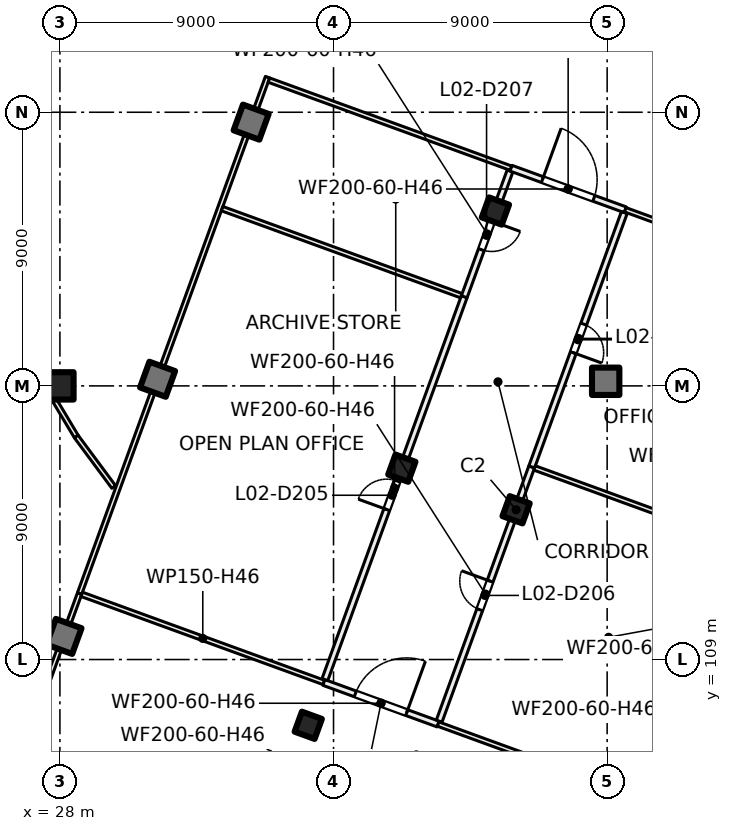
"""IFC4 building model, lengths in metres.
Left out: names, types, materials, properties, quantities, classifications, styles, units other than length and angle.
Written with IfcOpenShell. Run it as: python <this file> out.ifc"""

import sys

from ifc_helpers import new_model, si_unit, direction, frame, frame_2d, origin, origin_2d, place, context, subcontext, project, spatial, rectangle, extrude, element, fill, save


model = new_model("IFC4")
c1 = context("Model", 3, precision=1e-05, world=origin(), true_north=direction((0.0, 1.0)))
c2 = subcontext(c1, "Body", "Model", "MODEL_VIEW")
j1 = project(units=[si_unit("LENGTHUNIT", "METRE"), si_unit("PLANEANGLEUNIT", "RADIAN")], contexts=[c1])
p1 = place(None, origin())
s1 = spatial("IfcSite", under=j1, at=p1, CompositionType="ELEMENT")
p2 = place(p1, origin())
s2 = spatial("IfcBuilding", under=s1, at=p2, CompositionType="ELEMENT")
p3 = place(p2, frame((0.0, 0.0, 12.5)))
s3 = spatial("IfcBuildingStorey", under=s2, at=p3, CompositionType="ELEMENT", Elevation=12.5)
for number, where, z_axis, x_axis in (
    (1, (28.0, 118.0, 0.0), (0.0, 0.0, 1.0), (1.0, 0.0, 0.0)),
    (2, (45.952, 118.152, 0.0), (0.0, 0.0, 1.0), (1.0, 0.0, 0.0)),
):
    element("IfcColumn", number, at=place(p3, frame(where, z_axis=z_axis, x_axis=x_axis)), inside=s3, PredefinedType="COLUMN", context=c2, shape_type="SweptSolid", body=[
        extrude(rectangle(XDim=0.9, YDim=0.9, at=origin_2d()), origin(), (0.0, 0.0, 1.0), 5.0),
    ])
for number, where, z_axis, x_axis in (
    (3, (43.006, 113.925, 0.0), (0.0, 0.0, 1.0), (-0.342, -0.94, 0.0)),
    (4, (42.325, 123.751, 0.0), (0.0, 0.0, 1.0), (-0.342, -0.94, 0.0)),
    (5, (39.247, 115.293, 0.0), (0.0, 0.0, 1.0), (-0.342, -0.94, 0.0)),
    (6, (36.169, 106.836, 0.0), (0.0, 0.0, 1.0), (-0.342, -0.94, 0.0)),
):
    element("IfcColumn", number, at=place(p3, frame(where, z_axis=z_axis, x_axis=x_axis)), inside=s3, PredefinedType="COLUMN", context=c2, shape_type="SweptSolid", body=[
        extrude(rectangle(XDim=0.7, YDim=0.7, at=origin_2d()), origin(), (0.0, 0.0, 1.0), 5.0),
    ])
for number, where, z_axis, x_axis in (
    (7, (34.291, 126.675, 0.0), (0.0, 0.0, 1.0), (-0.342, -0.94, 0.0)),
    (8, (31.212, 118.218, 0.0), (0.0, 0.0, 1.0), (-0.342, -0.94, 0.0)),
    (9, (28.134, 109.76, 0.0), (0.0, 0.0, 1.0), (-0.342, -0.94, 0.0)),
):
    element("IfcColumn", number, at=place(p3, frame(where, z_axis=z_axis, x_axis=x_axis)), inside=s3, PredefinedType="COLUMN", context=c2, shape_type="SweptSolid", body=[
        extrude(rectangle(XDim=0.9, YDim=0.9, at=origin_2d()), origin(), (0.0, 0.0, 1.0), 5.0),
    ])
p4 = place(p3, frame((12.199, 89.809, 0.0), z_axis=(0.0, 0.0, 1.0), x_axis=(0.342022998908, 0.939691581434, 0.0)))
e10 = element("IfcWall", 10, at=p4, inside=s3, PredefinedType="SOLIDWALL", context=c2, shape_type="SweptSolid", body=[
    extrude(rectangle(XDim=47.334, YDim=0.6, at=frame_2d((23.667, 0.0))), origin(), (0.0, 0.0, 1.0), 4.6),
])
p5 = place(p4, frame((0.773, 0.0, 0.9)))
e11 = element("IfcOpeningElement", 11, at=p5, cuts=e10, PredefinedType="OPENING", context=c2, shape_type="SweptSolid", body=[
    extrude(rectangle(XDim=3.0, YDim=3.0, at=frame_2d((1.5, 1.5))), frame((0.0, 0.31, 0.0), z_axis=(0.0, -1.0, 0.0), x_axis=(1.0, 0.0, 0.0)), (0.0, 0.0, 1.0), 0.62),
])
p6 = place(p4, frame((5.379, 0.0, 0.9)))
e12 = element("IfcOpeningElement", 12, at=p6, cuts=e10, PredefinedType="OPENING", context=c2, shape_type="SweptSolid", body=[
    extrude(rectangle(XDim=3.0, YDim=3.0, at=frame_2d((1.5, 1.5))), frame((0.0, 0.31, 0.0), z_axis=(0.0, -1.0, 0.0), x_axis=(1.0, 0.0, 0.0)), (0.0, 0.0, 1.0), 0.62),
])
p7 = place(p4, frame((9.235, 0.0, 0.9)))
e13 = element("IfcOpeningElement", 13, at=p7, cuts=e10, PredefinedType="OPENING", context=c2, shape_type="SweptSolid", body=[
    extrude(rectangle(XDim=3.0, YDim=3.0, at=frame_2d((1.5, 1.5))), frame((0.0, 0.31, 0.0), z_axis=(0.0, -1.0, 0.0), x_axis=(1.0, 0.0, 0.0)), (0.0, 0.0, 1.0), 0.62),
])
p8 = place(p4, frame((14.786, 0.0, 0.9)))
e14 = element("IfcOpeningElement", 14, at=p8, cuts=e10, PredefinedType="OPENING", context=c2, shape_type="SweptSolid", body=[
    extrude(rectangle(XDim=1.2, YDim=3.0, at=frame_2d((0.6, 1.5))), frame((0.0, 0.31, 0.0), z_axis=(0.0, -1.0, 0.0), x_axis=(1.0, 0.0, 0.0)), (0.0, 0.0, 1.0), 0.62),
])
p9 = place(p4, frame((16.286, 0.0, 0.9)))
e15 = element("IfcOpeningElement", 15, at=p9, cuts=e10, PredefinedType="OPENING", context=c2, shape_type="SweptSolid", body=[
    extrude(rectangle(XDim=1.2, YDim=3.0, at=frame_2d((0.6, 1.5))), frame((0.0, 0.31, 0.0), z_axis=(0.0, -1.0, 0.0), x_axis=(1.0, 0.0, 0.0)), (0.0, 0.0, 1.0), 0.62),
])
p10 = place(p4, frame((18.118, 0.0, 0.9)))
e16 = element("IfcOpeningElement", 16, at=p10, cuts=e10, PredefinedType="OPENING", context=c2, shape_type="SweptSolid", body=[
    extrude(rectangle(XDim=1.2, YDim=3.0, at=frame_2d((0.6, 1.5))), frame((0.0, 0.31, 0.0), z_axis=(0.0, -1.0, 0.0), x_axis=(1.0, 0.0, 0.0)), (0.0, 0.0, 1.0), 0.62),
])
p11 = place(p4, frame((19.618, 0.0, 0.9)))
e17 = element("IfcOpeningElement", 17, at=p11, cuts=e10, PredefinedType="OPENING", context=c2, shape_type="SweptSolid", body=[
    extrude(rectangle(XDim=1.2, YDim=3.0, at=frame_2d((0.6, 1.5))), frame((0.0, 0.31, 0.0), z_axis=(0.0, -1.0, 0.0), x_axis=(1.0, 0.0, 0.0)), (0.0, 0.0, 1.0), 0.62),
])
p12 = place(p4, frame((22.452, 0.0, 0.9)))
e18 = element("IfcOpeningElement", 18, at=p12, cuts=e10, PredefinedType="OPENING", context=c2, shape_type="SweptSolid", body=[
    extrude(rectangle(XDim=3.0, YDim=3.0, at=frame_2d((1.5, 1.5))), frame((0.0, 0.31, 0.0), z_axis=(0.0, -1.0, 0.0), x_axis=(1.0, 0.0, 0.0)), (0.0, 0.0, 1.0), 0.62),
])
p13 = place(p4, frame((26.458, 0.0, 0.9)))
e19 = element("IfcOpeningElement", 19, at=p13, cuts=e10, PredefinedType="OPENING", context=c2, shape_type="SweptSolid", body=[
    extrude(rectangle(XDim=3.0, YDim=3.0, at=frame_2d((1.5, 1.5))), frame((0.0, 0.31, 0.0), z_axis=(0.0, -1.0, 0.0), x_axis=(1.0, 0.0, 0.0)), (0.0, 0.0, 1.0), 0.62),
])
p14 = place(p4, frame((31.064, 0.0, 0.9)))
e20 = element("IfcOpeningElement", 20, at=p14, cuts=e10, PredefinedType="OPENING", context=c2, shape_type="SweptSolid", body=[
    extrude(rectangle(XDim=3.0, YDim=3.0, at=frame_2d((1.5, 1.5))), frame((0.0, 0.31, 0.0), z_axis=(0.0, -1.0, 0.0), x_axis=(1.0, 0.0, 0.0)), (0.0, 0.0, 1.0), 0.62),
])
p15 = place(p4, frame((36.029, 0.0, 0.9)))
e21 = element("IfcOpeningElement", 21, at=p15, cuts=e10, PredefinedType="OPENING", context=c2, shape_type="SweptSolid", body=[
    extrude(rectangle(XDim=1.2, YDim=3.0, at=frame_2d((0.6, 1.5))), frame((0.0, 0.31, 0.0), z_axis=(0.0, -1.0, 0.0), x_axis=(1.0, 0.0, 0.0)), (0.0, 0.0, 1.0), 0.62),
])
p16 = place(p4, frame((39.676, 0.0, 0.9)))
e22 = element("IfcOpeningElement", 22, at=p16, cuts=e10, PredefinedType="OPENING", context=c2, shape_type="SweptSolid", body=[
    extrude(rectangle(XDim=3.0, YDim=3.0, at=frame_2d((1.5, 1.5))), frame((0.0, 0.31, 0.0), z_axis=(0.0, -1.0, 0.0), x_axis=(1.0, 0.0, 0.0)), (0.0, 0.0, 1.0), 0.62),
])
p17 = place(p4, frame((43.531, 0.0, 0.9)))
e23 = element("IfcOpeningElement", 23, at=p17, cuts=e10, PredefinedType="OPENING", context=c2, shape_type="SweptSolid", body=[
    extrude(rectangle(XDim=3.0, YDim=3.0, at=frame_2d((1.5, 1.5))), frame((0.0, 0.31, 0.0), z_axis=(0.0, -1.0, 0.0), x_axis=(1.0, 0.0, 0.0)), (0.0, 0.0, 1.0), 0.62),
])
p18 = place(p3, frame((27.478, 118.104, 0.0), z_axis=(0.0, 0.0, 1.0), x_axis=(0.514009565734, -0.857784452141, 0.0)))
e24 = element("IfcWall", 24, at=p18, inside=s3, PredefinedType="PARTITIONING", context=c2, shape_type="SweptSolid", body=[
    extrude(rectangle(XDim=2.068, YDim=0.15, at=frame_2d((1.034, 0.0))), origin(), (0.0, 0.0, 1.0), 4.6),
])
p19 = place(p3, frame((27.494, 108.0, 0.0), z_axis=(0.0, 0.0, 1.0), x_axis=(0.341841854689, 0.93975749339, 0.0)))
e25 = element("IfcWall", 25, at=p19, inside=s3, PredefinedType="PARTITIONING", context=c2, shape_type="SweptSolid", body=[
    extrude(rectangle(XDim=3.373, YDim=0.15, at=frame_2d((1.687, 0.0))), origin(), (0.0, 0.0, 1.0), 4.6),
])
p20 = place(p3, frame((28.537, 116.336, 0.0), z_axis=(0.0, 0.0, 1.0), x_axis=(0.595741297031, -0.80317638599, 0.0)))
e26 = element("IfcWall", 26, at=p20, inside=s3, PredefinedType="PARTITIONING", context=c2, shape_type="SweptSolid", body=[
    extrude(rectangle(XDim=2.068, YDim=0.15, at=frame_2d((1.034, 0.0))), origin(), (0.0, 0.0, 1.0), 4.6),
])
p21 = place(p3, frame((28.647, 111.17, 0.0), z_axis=(0.0, 0.0, 1.0), x_axis=(0.342087921954, 0.939667948614, 0.0)))
e27 = element("IfcWall", 27, at=p21, inside=s3, PredefinedType="PARTITIONING", context=c2, shape_type="SweptSolid", body=[
    extrude(rectangle(XDim=18.075, YDim=0.15, at=frame_2d((9.037, 0.0))), origin(), (0.0, 0.0, 1.0), 4.6),
])
p22 = place(p3, frame((28.717, 111.144, 0.0), z_axis=(0.0, 0.0, 1.0), x_axis=(0.939731172492, -0.341914204803, 0.0)))
e28 = element("IfcWall", 28, at=p22, inside=s3, PredefinedType="PARTITIONING", context=c2, shape_type="SweptSolid", body=[
    extrude(rectangle(XDim=8.476, YDim=0.15, at=frame_2d((4.238, 0.0))), origin(), (0.0, 0.0, 1.0), 4.6),
])
p23 = place(p3, frame((33.335, 123.83, 0.0), z_axis=(0.0, 0.0, 1.0), x_axis=(0.939710837098, -0.341970090272, 0.0)))
e29 = element("IfcWall", 29, at=p23, inside=s3, PredefinedType="PARTITIONING", context=c2, shape_type="SweptSolid", body=[
    extrude(rectangle(XDim=8.375, YDim=0.15, at=frame_2d((4.188, 0.0))), origin(), (0.0, 0.0, 1.0), 4.6),
])
p24 = place(p3, frame((34.874, 128.058, 0.0), z_axis=(0.0, 0.0, 1.0), x_axis=(0.939708443164, -0.341976668571, 0.0)))
e30 = element("IfcWall", 30, at=p24, inside=s3, PredefinedType="PARTITIONING", context=c2, shape_type="SweptSolid", body=[
    extrude(rectangle(XDim=8.475, YDim=0.15, at=frame_2d((4.237, 0.0))), origin(), (0.0, 0.0, 1.0), 4.6),
])
p25 = place(p3, frame((40.44, 106.878, 0.0), z_axis=(0.0, 0.0, 1.0), x_axis=(-0.939665029144, 0.342095941228, 0.0)))
e31 = element("IfcWall", 31, at=p25, inside=s3, PredefinedType="PARTITIONING", context=c2, shape_type="SweptSolid", body=[
    extrude(rectangle(XDim=3.999, YDim=0.2, at=frame_2d((2.0, 0.0))), origin(), (0.0, 0.0, 1.0), 4.6),
])
p26 = place(p25, frame((1.099, 0.0, 0.0)))
e32 = element("IfcOpeningElement", 32, at=p26, cuts=e31, PredefinedType="OPENING", context=c2, shape_type="SweptSolid", body=[
    extrude(rectangle(XDim=1.8, YDim=2.1, at=frame_2d((0.9, 1.05))), frame((0.0, 0.11, 0.0), z_axis=(0.0, -1.0, 0.0), x_axis=(1.0, 0.0, 0.0)), (0.0, 0.0, 1.0), 0.22),
])
p27 = place(p3, frame((36.716, 108.34, 0.0), z_axis=(0.0, 0.0, 1.0), x_axis=(0.342018071111, 0.939693375008, 0.0)))
e33 = element("IfcWall", 33, at=p27, inside=s3, PredefinedType="PARTITIONING", context=c2, shape_type="SweptSolid", body=[
    extrude(rectangle(XDim=13.4, YDim=0.2, at=frame_2d((6.7, 0.0))), origin(), (0.0, 0.0, 1.0), 4.6),
])
p28 = place(p27, frame((5.952, 0.0, 0.0)))
e34 = element("IfcOpeningElement", 34, at=p28, cuts=e33, PredefinedType="OPENING", context=c2, shape_type="SweptSolid", body=[
    extrude(rectangle(XDim=1.0, YDim=2.1, at=frame_2d((0.5, 1.05))), frame((0.0, 0.11, 0.0), z_axis=(0.0, -1.0, 0.0), x_axis=(1.0, 0.0, 0.0)), (0.0, 0.0, 1.0), 0.22),
])
p29 = place(p3, frame((43.519, 115.335, 0.0), z_axis=(0.0, 0.0, 1.0), x_axis=(-0.342121866134, -0.939655590476, 0.0)))
e35 = element("IfcWall", 35, at=p29, inside=s3, PredefinedType="PARTITIONING", context=c2, shape_type="SweptSolid", body=[
    extrude(rectangle(XDim=8.9, YDim=0.2, at=frame_2d((4.45, 0.0))), origin(), (0.0, 0.0, 1.0), 4.6),
])
p30 = place(p29, frame((3.998, 0.0, 0.0)))
e36 = element("IfcOpeningElement", 36, at=p30, cuts=e35, PredefinedType="OPENING", context=c2, shape_type="SweptSolid", body=[
    extrude(rectangle(XDim=1.0, YDim=2.1, at=frame_2d((0.5, 1.05))), frame((0.0, 0.11, 0.0), z_axis=(0.0, -1.0, 0.0), x_axis=(1.0, 0.0, 0.0)), (0.0, 0.0, 1.0), 0.22),
])
p31 = place(p3, frame((40.44, 106.878, 0.0), z_axis=(0.0, 0.0, 1.0), x_axis=(0.939672748075, -0.342074738216, 0.0)))
e37 = element("IfcWall", 37, at=p31, inside=s3, PredefinedType="PARTITIONING", context=c2, shape_type="SweptSolid", body=[
    extrude(rectangle(XDim=8.451, YDim=0.15, at=frame_2d((4.226, 0.0))), origin(), (0.0, 0.0, 1.0), 4.6),
])
p32 = place(p3, frame((41.299, 120.932, 0.0), z_axis=(0.0, 0.0, 1.0), x_axis=(0.342063854115, 0.939676710208, 0.0)))
e38 = element("IfcWall", 38, at=p32, inside=s3, PredefinedType="PARTITIONING", context=c2, shape_type="SweptSolid", body=[
    extrude(rectangle(XDim=4.399, YDim=0.2, at=frame_2d((2.2, 0.0))), origin(), (0.0, 0.0, 1.0), 4.6),
])
p33 = place(p32, frame((1.648, 0.0, 0.0)))
e39 = element("IfcOpeningElement", 39, at=p33, cuts=e38, PredefinedType="OPENING", context=c2, shape_type="SweptSolid", body=[
    extrude(rectangle(XDim=1.0, YDim=2.1, at=frame_2d((0.5, 1.05))), frame((0.0, 0.11, 0.0), z_axis=(0.0, -1.0, 0.0), x_axis=(1.0, 0.0, 0.0)), (0.0, 0.0, 1.0), 0.22),
])
p34 = place(p3, frame((42.838, 125.16, 0.0), z_axis=(0.0, 0.0, 1.0), x_axis=(0.939713209288, -0.341963571582, 0.0)))
e40 = element("IfcWall", 40, at=p34, inside=s3, PredefinedType="PARTITIONING", context=c2, shape_type="SweptSolid", body=[
    extrude(rectangle(XDim=4.0, YDim=0.2, at=frame_2d((2.0, 0.0))), origin(), (0.0, 0.0, 1.0), 4.6),
])
p35 = place(p34, frame((1.1, 0.0, 0.0)))
e41 = element("IfcOpeningElement", 41, at=p35, cuts=e40, PredefinedType="OPENING", context=c2, shape_type="SweptSolid", body=[
    extrude(rectangle(XDim=1.8, YDim=2.1, at=frame_2d((0.9, 1.05))), frame((0.0, 0.11, 0.0), z_axis=(0.0, -1.0, 0.0), x_axis=(1.0, 0.0, 0.0)), (0.0, 0.0, 1.0), 0.22),
])
p36 = place(p3, frame((46.563, 123.698, 0.0), z_axis=(0.0, 0.0, 1.0), x_axis=(-0.342024978895, -0.939690860768, 0.0)))
e42 = element("IfcWall", 42, at=p36, inside=s3, PredefinedType="PARTITIONING", context=c2, shape_type="SweptSolid", body=[
    extrude(rectangle(XDim=8.9, YDim=0.2, at=frame_2d((4.45, 0.0))), origin(), (0.0, 0.0, 1.0), 4.6),
])
p37 = place(p36, frame((3.902, 0.0, 0.0)))
e43 = element("IfcOpeningElement", 43, at=p37, cuts=e42, PredefinedType="OPENING", context=c2, shape_type="SweptSolid", body=[
    extrude(rectangle(XDim=1.0, YDim=2.1, at=frame_2d((0.5, 1.05))), frame((0.0, 0.11, 0.0), z_axis=(0.0, -1.0, 0.0), x_axis=(1.0, 0.0, 0.0)), (0.0, 0.0, 1.0), 0.22),
])
p38 = place(p3, frame((43.613, 115.301, 0.0), z_axis=(0.0, 0.0, 1.0), x_axis=(0.93970742794, -0.341979458265, 0.0)))
e44 = element("IfcWall", 44, at=p38, inside=s3, PredefinedType="PARTITIONING", context=c2, shape_type="SweptSolid", body=[
    extrude(rectangle(XDim=8.375, YDim=0.15, at=frame_2d((4.188, 0.0))), origin(), (0.0, 0.0, 1.0), 4.6),
])
p39 = place(p3, frame((46.597, 123.792, 0.0), z_axis=(0.0, 0.0, 1.0), x_axis=(0.939619227089, -0.342221723572, 0.0)))
e45 = element("IfcWall", 45, at=p39, inside=s3, PredefinedType="PARTITIONING", context=c2, shape_type="SweptSolid", body=[
    extrude(rectangle(XDim=3.276, YDim=0.15, at=frame_2d((1.638, 0.0))), origin(), (0.0, 0.0, 1.0), 4.6),
])
p40 = place(p26, origin())
e46 = element("IfcDoor", 46, at=p40, inside=s3, OperationType="DOUBLE_DOOR_SINGLE_SWING", PredefinedType="DOOR", context=c2, shape_type="SweptSolid", body=[
    extrude(rectangle(XDim=1.8, YDim=2.1, at=frame_2d((0.9, 1.05))), frame((0.0, 0.025, 0.0), z_axis=(0.0, -1.0, 0.0), x_axis=(1.0, 0.0, 0.0)), (0.0, 0.0, 1.0), 0.05),
])
fill(e32, e46)
p41 = place(p28, origin())
e47 = element("IfcDoor", 47, at=p41, inside=s3, OperationType="SINGLE_SWING_LEFT", PredefinedType="DOOR", context=c2, shape_type="SweptSolid", body=[
    extrude(rectangle(XDim=1.0, YDim=2.1, at=frame_2d((0.5, 1.05))), frame((0.0, 0.025, 0.0), z_axis=(0.0, -1.0, 0.0), x_axis=(1.0, 0.0, 0.0)), (0.0, 0.0, 1.0), 0.05),
])
fill(e34, e47)
p42 = place(p30, origin())
e48 = element("IfcDoor", 48, at=p42, inside=s3, OperationType="SINGLE_SWING_LEFT", PredefinedType="DOOR", context=c2, shape_type="SweptSolid", body=[
    extrude(rectangle(XDim=1.0, YDim=2.1, at=frame_2d((0.5, 1.05))), frame((0.0, 0.025, 0.0), z_axis=(0.0, -1.0, 0.0), x_axis=(1.0, 0.0, 0.0)), (0.0, 0.0, 1.0), 0.05),
])
fill(e36, e48)
p43 = place(p33, origin())
e49 = element("IfcDoor", 49, at=p43, inside=s3, OperationType="SINGLE_SWING_RIGHT", PredefinedType="DOOR", context=c2, shape_type="SweptSolid", body=[
    extrude(rectangle(XDim=1.0, YDim=2.1, at=frame_2d((0.5, 1.05))), frame((0.0, 0.025, 0.0), z_axis=(0.0, -1.0, 0.0), x_axis=(1.0, 0.0, 0.0)), (0.0, 0.0, 1.0), 0.05),
])
fill(e39, e49)
p44 = place(p35, origin())
e50 = element("IfcDoor", 50, at=p44, inside=s3, OperationType="DOUBLE_DOOR_SINGLE_SWING", PredefinedType="DOOR", context=c2, shape_type="SweptSolid", body=[
    extrude(rectangle(XDim=1.8, YDim=2.1, at=frame_2d((0.9, 1.05))), frame((0.0, 0.025, 0.0), z_axis=(0.0, -1.0, 0.0), x_axis=(1.0, 0.0, 0.0)), (0.0, 0.0, 1.0), 0.05),
])
fill(e41, e50)
p45 = place(p37, origin())
e51 = element("IfcDoor", 51, at=p45, inside=s3, OperationType="SINGLE_SWING_RIGHT", PredefinedType="DOOR", context=c2, shape_type="SweptSolid", body=[
    extrude(rectangle(XDim=1.0, YDim=2.1, at=frame_2d((0.5, 1.05))), frame((0.0, 0.025, 0.0), z_axis=(0.0, -1.0, 0.0), x_axis=(1.0, 0.0, 0.0)), (0.0, 0.0, 1.0), 0.05),
])
fill(e43, e51)
save(model, sys.argv[1])
